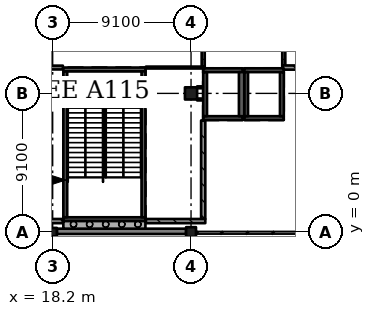
"""IFC4 building model, lengths in metres.
Left out: names, types, materials, properties, quantities, classifications, styles, units other than length and angle.
Written with IfcOpenShell. Run it as: python <this file> out.ifc"""

import sys

from ifc_helpers import new_model, si_unit, direction, frame, frame_2d, origin, origin_2d, place, context, subcontext, project, spatial, rectangle, extrude, element, fill, save


model = new_model("IFC4")
c1 = context("Model", 3, precision=1e-05, world=origin(), true_north=direction((0.0, 1.0)))
c2 = subcontext(c1, "Body", "Model", "MODEL_VIEW")
j1 = project(units=[si_unit("LENGTHUNIT", "METRE"), si_unit("PLANEANGLEUNIT", "RADIAN")], contexts=[c1])
p1 = place(None, origin())
s1 = spatial("IfcSite", under=j1, at=p1, CompositionType="ELEMENT")
p2 = place(p1, origin())
s2 = spatial("IfcBuilding", under=s1, at=p2, CompositionType="ELEMENT")
p3 = place(p2, frame((0.0, 0.0, 6.37)))
s3 = spatial("IfcBuildingStorey", under=s2, at=p3, CompositionType="ELEMENT", Elevation=6.37)
p4 = place(p3, frame((18.2, -0.025, 0.0), z_axis=(0.0, 0.0, 1.0), x_axis=(1.0, 0.0, 0.0)))
e1 = element("IfcColumn", 1, at=p4, inside=s3, PredefinedType="COLUMN", context=c2, shape_type="SweptSolid", body=[
    extrude(rectangle(XDim=0.55, YDim=0.55, at=origin_2d()), origin(), (0.0, 0.0, 1.0), 4.55),
])
p5 = place(p3, frame((18.2, 9.1, 0.0), z_axis=(0.0, 0.0, 1.0), x_axis=(1.0, 0.0, 0.0)))
e2 = element("IfcColumn", 2, at=p5, inside=s3, PredefinedType="COLUMN", context=c2, shape_type="SweptSolid", body=[
    extrude(rectangle(XDim=0.7, YDim=0.7, at=origin_2d()), origin(), (0.0, 0.0, 1.0), 4.55),
])
p6 = place(p3, frame((27.3, -0.025, 0.0), z_axis=(0.0, 0.0, 1.0), x_axis=(1.0, 0.0, 0.0)))
e3 = element("IfcColumn", 3, at=p6, inside=s3, PredefinedType="COLUMN", context=c2, shape_type="SweptSolid", body=[
    extrude(rectangle(XDim=0.65, YDim=0.65, at=origin_2d()), origin(), (0.0, 0.0, 1.0), 4.55),
])
p7 = place(p3, frame((27.3, 9.1, 0.0), z_axis=(0.0, 0.0, 1.0), x_axis=(1.0, 0.0, 0.0)))
e4 = element("IfcColumn", 4, at=p7, inside=s3, PredefinedType="COLUMN", context=c2, shape_type="SweptSolid", body=[
    extrude(rectangle(XDim=0.8, YDim=0.8, at=origin_2d()), origin(), (0.0, 0.0, 1.0), 4.55),
])
p8 = place(p3, frame((30.7, 7.475, 0.0), z_axis=(0.0, 0.0, 1.0), x_axis=(-1.0, 0.0, 0.0)))
e5 = element("IfcWall", 5, at=p8, inside=s3, PredefinedType="SHEAR", context=c2, shape_type="SweptSolid", body=[
    extrude(rectangle(XDim=2.6, YDim=0.25, at=frame_2d((1.3, 0.0))), origin(), (0.0, 0.0, 1.0), 4.55),
])
p9 = place(p3, frame((30.7, 10.625, 0.0), z_axis=(0.0, 0.0, 1.0), x_axis=(-1.0, 0.0, 0.0)))
e6 = element("IfcWall", 6, at=p9, inside=s3, PredefinedType="SHEAR", context=c2, shape_type="SweptSolid", body=[
    extrude(rectangle(XDim=2.6, YDim=0.25, at=frame_2d((1.3, 0.0))), origin(), (0.0, 0.0, 1.0), 4.55),
])
p10 = place(p9, frame((0.8, 0.0, 0.0)))
e7 = element("IfcOpeningElement", 7, at=p10, cuts=e6, PredefinedType="OPENING", context=c2, shape_type="SweptSolid", body=[
    extrude(rectangle(XDim=1.0, YDim=2.1, at=frame_2d((0.5, 1.05))), frame((0.0, 0.135, 0.0), z_axis=(0.0, -1.0, 0.0), x_axis=(1.0, 0.0, 0.0)), (0.0, 0.0, 1.0), 0.27),
])
p11 = place(p3, frame((28.225, 10.5, 0.0), z_axis=(0.0, 0.0, 1.0), x_axis=(0.0, -1.0, 0.0)))
e8 = element("IfcWall", 8, at=p11, inside=s3, PredefinedType="SHEAR", context=c2, shape_type="SweptSolid", body=[
    extrude(rectangle(XDim=2.9, YDim=0.25, at=frame_2d((1.45, 0.0))), origin(), (0.0, 0.0, 1.0), 4.55),
])
p12 = place(p3, frame((30.625, 10.5, 0.0), z_axis=(0.0, 0.0, 1.0), x_axis=(0.0, -1.0, 0.0)))
e9 = element("IfcWall", 9, at=p12, inside=s3, PredefinedType="SHEAR", context=c2, shape_type="SweptSolid", body=[
    extrude(rectangle(XDim=2.9, YDim=0.35, at=frame_2d((1.45, 0.0))), origin(), (0.0, 0.0, 1.0), 4.55),
])
p13 = place(p3, frame((33.4, 7.475, 0.0), z_axis=(0.0, 0.0, 1.0), x_axis=(-1.0, 0.0, 0.0)))
e10 = element("IfcWall", 10, at=p13, inside=s3, PredefinedType="SHEAR", context=c2, shape_type="SweptSolid", body=[
    extrude(rectangle(XDim=2.6, YDim=0.25, at=frame_2d((1.3, 0.0))), origin(), (0.0, 0.0, 1.0), 4.55),
])
p14 = place(p3, frame((33.4, 10.625, 0.0), z_axis=(0.0, 0.0, 1.0), x_axis=(-1.0, 0.0, 0.0)))
e11 = element("IfcWall", 11, at=p14, inside=s3, PredefinedType="SHEAR", context=c2, shape_type="SweptSolid", body=[
    extrude(rectangle(XDim=2.6, YDim=0.25, at=frame_2d((1.3, 0.0))), origin(), (0.0, 0.0, 1.0), 4.55),
])
p15 = place(p14, frame((0.8, 0.0, 0.0)))
e12 = element("IfcOpeningElement", 12, at=p15, cuts=e11, PredefinedType="OPENING", context=c2, shape_type="SweptSolid", body=[
    extrude(rectangle(XDim=1.0, YDim=2.1, at=frame_2d((0.5, 1.05))), frame((0.0, 0.135, 0.0), z_axis=(0.0, -1.0, 0.0), x_axis=(1.0, 0.0, 0.0)), (0.0, 0.0, 1.0), 0.27),
])
for number, where, z_axis, x_axis in (
    (13, (30.925, 10.5, 0.0), (0.0, 0.0, 1.0), (0.0, -1.0, 0.0)),
    (14, (33.275, 10.5, 0.0), (0.0, 0.0, 1.0), (0.0, -1.0, 0.0)),
):
    element("IfcWall", number, at=place(p3, frame(where, z_axis=z_axis, x_axis=x_axis)), inside=s3, PredefinedType="SHEAR", context=c2, shape_type="SweptSolid", body=[
        extrude(rectangle(XDim=2.9, YDim=0.25, at=frame_2d((1.45, 0.0))), origin(), (0.0, 0.0, 1.0), 4.55),
    ])
p16 = place(p3, frame((24.3, 0.825, 0.0), z_axis=(0.0, 0.0, 1.0), x_axis=(-1.0, 0.0, 0.0)))
e15 = element("IfcWall", 15, at=p16, inside=s3, PredefinedType="SHEAR", context=c2, shape_type="SweptSolid", body=[
    extrude(rectangle(XDim=5.4, YDim=0.25, at=frame_2d((2.7, 0.0))), origin(), (0.0, 0.0, 1.0), 4.55),
])
p17 = place(p3, frame((24.3, 10.675, 0.0), z_axis=(0.0, 0.0, 1.0), x_axis=(-1.0, 0.0, 0.0)))
e16 = element("IfcWall", 16, at=p17, inside=s3, PredefinedType="SHEAR", context=c2, shape_type="SweptSolid", body=[
    extrude(rectangle(XDim=5.4, YDim=0.25, at=frame_2d((2.7, 0.0))), origin(), (0.0, 0.0, 1.0), 4.55),
])
p18 = place(p17, frame((1.5, 0.0, 0.0)))
e17 = element("IfcOpeningElement", 17, at=p18, cuts=e16, PredefinedType="OPENING", context=c2, shape_type="SweptSolid", body=[
    extrude(rectangle(XDim=2.4, YDim=2.1, at=frame_2d((1.2, 1.05))), frame((0.0, 0.135, 0.0), z_axis=(0.0, -1.0, 0.0), x_axis=(1.0, 0.0, 0.0)), (0.0, 0.0, 1.0), 0.27),
])
for number, where, z_axis, x_axis in (
    (18, (19.025, 10.55, 0.0), (0.0, 0.0, 1.0), (0.0, -1.0, 0.0)),
    (19, (24.175, 10.55, 0.0), (0.0, 0.0, 1.0), (0.0, -1.0, 0.0)),
):
    element("IfcWall", number, at=place(p3, frame(where, z_axis=z_axis, x_axis=x_axis)), inside=s3, PredefinedType="SHEAR", context=c2, shape_type="SweptSolid", body=[
        extrude(rectangle(XDim=9.6, YDim=0.25, at=frame_2d((4.8, 0.0))), origin(), (0.0, 0.0, 1.0), 4.55),
    ])
p19 = place(p3, frame((18.475, 0.025, 0.0), z_axis=(0.0, 0.0, 1.0), x_axis=(1.0, 0.0, 0.0)))
e20 = element("IfcWall", 20, at=p19, inside=s3, PredefinedType="SOLIDWALL", context=c2, shape_type="SweptSolid", body=[
    extrude(rectangle(XDim=8.5, YDim=0.35, at=frame_2d((4.25, 0.0))), origin(), (0.0, 0.0, 1.0), 3.5),
])
p20 = place(p3, frame((18.9, 0.45, 0.0), z_axis=(0.0, 0.0, 1.0), x_axis=(1.0, 0.0, 0.0)))
e21 = element("IfcWall", 21, at=p20, inside=s3, PredefinedType="SOLIDWALL", context=c2, shape_type="SweptSolid", body=[
    extrude(rectangle(XDim=5.4, YDim=0.5, at=frame_2d((2.7, 0.0))), origin(), (0.0, 0.0, 1.0), 4.55),
])
p21 = place(p3, frame((18.55, 8.75, 0.0), z_axis=(0.0, 0.0, 1.0), x_axis=(1.0, 0.0, 0.0)))
e22 = element("IfcWall", 22, at=p21, inside=s3, PredefinedType="SOLIDWALL", context=c2, shape_type="SweptSolid", body=[
    extrude(rectangle(XDim=0.32, YDim=0.25, at=frame_2d((0.16, 0.0))), origin(), (0.0, 0.0, 1.0), 4.25),
])
p22 = place(p3, frame((18.87, 0.7, 0.0), z_axis=(0.0, 0.0, 1.0), x_axis=(-1.0, 0.0, 0.0)))
e23 = element("IfcWall", 23, at=p22, inside=s3, PredefinedType="SOLIDWALL", context=c2, shape_type="SweptSolid", body=[
    extrude(rectangle(XDim=3.64, YDim=0.275, at=frame_2d((1.82, 0.0))), origin(), (0.0, 0.0, 1.0), 4.25),
])
p23 = place(p3, frame((18.87, 9.45, 0.0), z_axis=(0.0, 0.0, 1.0), x_axis=(-1.0, 0.0, 0.0)))
e24 = element("IfcWall", 24, at=p23, inside=s3, PredefinedType="SOLIDWALL", context=c2, shape_type="SweptSolid", body=[
    extrude(rectangle(XDim=0.32, YDim=0.25, at=frame_2d((0.16, 0.0))), origin(), (0.0, 0.0, 1.0), 4.25),
])
p24 = place(p3, frame((18.87, 10.8, 0.0), z_axis=(0.0, 0.0, 1.0), x_axis=(-1.0, 0.0, 0.0)))
e25 = element("IfcWall", 25, at=p24, inside=s3, PredefinedType="SOLIDWALL", context=c2, shape_type="SweptSolid", body=[
    extrude(rectangle(XDim=3.64, YDim=0.25, at=frame_2d((1.82, 0.0))), origin(), (0.0, 0.0, 1.0), 4.25),
])
p25 = place(p24, frame((1.35, 0.0, 0.0)))
e26 = element("IfcOpeningElement", 26, at=p25, cuts=e25, PredefinedType="OPENING", context=c2, shape_type="SweptSolid", body=[
    extrude(rectangle(XDim=1.0, YDim=2.1, at=frame_2d((0.5, 1.05))), frame((0.0, 0.135, 0.0), z_axis=(0.0, -1.0, 0.0), x_axis=(1.0, 0.0, 0.0)), (0.0, 0.0, 1.0), 0.27),
])
for number, where, z_axis, x_axis in (
    (27, (27.7, 8.7, 0.0), (0.0, 0.0, 1.0), (1.0, 0.0, 0.0)),
    (28, (28.07, 9.5, 0.0), (0.0, 0.0, 1.0), (-1.0, 0.0, 0.0)),
):
    element("IfcWall", number, at=place(p3, frame(where, z_axis=z_axis, x_axis=x_axis)), inside=s3, PredefinedType="PARTITIONING", context=c2, shape_type="SweptSolid", body=[
        extrude(rectangle(XDim=0.37, YDim=0.125, at=frame_2d((0.185, 0.0))), origin(), (0.0, 0.0, 1.0), 4.25),
    ])
p26 = place(p3, frame((28.1, 7.32, 0.0), z_axis=(0.0, 0.0, 1.0), x_axis=(0.0, -1.0, 0.0)))
e29 = element("IfcWall", 29, at=p26, inside=s3, PredefinedType="SOLIDWALL", context=c2, shape_type="SweptSolid", body=[
    extrude(rectangle(XDim=6.483, YDim=0.275, at=frame_2d((3.241, 0.0))), origin(), (0.0, 0.0, 1.0), 4.25),
])
p27 = place(p3, frame((28.1, 13.7, 0.0), z_axis=(0.0, 0.0, 1.0), x_axis=(0.0, -1.0, 0.0)))
e30 = element("IfcWall", 30, at=p27, inside=s3, PredefinedType="PARTITIONING", context=c2, shape_type="SweptSolid", body=[
    extrude(rectangle(XDim=2.837, YDim=0.2, at=frame_2d((1.419, 0.0))), origin(), (0.0, 0.0, 1.0), 4.25),
])
p28 = place(p27, frame((0.55, 0.0, 0.0)))
e31 = element("IfcOpeningElement", 31, at=p28, cuts=e30, PredefinedType="OPENING", context=c2, shape_type="SweptSolid", body=[
    extrude(rectangle(XDim=1.8, YDim=2.4, at=frame_2d((0.9, 1.2))), frame((0.0, 0.11, 0.0), z_axis=(0.0, -1.0, 0.0), x_axis=(1.0, 0.0, 0.0)), (0.0, 0.0, 1.0), 0.22),
])
p29 = place(p3, frame((28.2, 10.8, 0.0), z_axis=(0.0, 0.0, 1.0), x_axis=(-1.0, 0.0, 0.0)))
e32 = element("IfcWall", 32, at=p29, inside=s3, PredefinedType="PARTITIONING", context=c2, shape_type="SweptSolid", body=[
    extrude(rectangle(XDim=3.87, YDim=0.125, at=frame_2d((1.935, 0.0))), origin(), (0.0, 0.0, 1.0), 4.25),
])
p30 = place(p29, frame((1.45, 0.0, 0.0)))
e33 = element("IfcOpeningElement", 33, at=p30, cuts=e32, PredefinedType="OPENING", context=c2, shape_type="SweptSolid", body=[
    extrude(rectangle(XDim=0.9, YDim=2.1, at=frame_2d((0.45, 1.05))), frame((0.0, 0.073, 0.0), z_axis=(0.0, -1.0, 0.0), x_axis=(1.0, 0.0, 0.0)), (0.0, 0.0, 1.0), 0.145),
])
p31 = place(p3, frame((28.238, 0.7, 0.0), z_axis=(0.0, 0.0, 1.0), x_axis=(-1.0, 0.0, 0.0)))
e34 = element("IfcWall", 34, at=p31, inside=s3, PredefinedType="SOLIDWALL", context=c2, shape_type="SweptSolid", body=[
    extrude(rectangle(XDim=3.907, YDim=0.275, at=frame_2d((1.954, 0.0))), origin(), (0.0, 0.0, 1.0), 4.25),
])
p32 = place(p3, frame((33.4, 10.938, 0.0), z_axis=(0.0, 0.0, 1.0), x_axis=(0.0, 1.0, 0.0)))
e35 = element("IfcWall", 35, at=p32, inside=s3, PredefinedType="PARTITIONING", context=c2, shape_type="SweptSolid", body=[
    extrude(rectangle(XDim=2.762, YDim=0.2, at=frame_2d((1.381, 0.0))), origin(), (0.0, 0.0, 1.0), 4.25),
])
p33 = place(p32, frame((0.45, 0.0, 0.0)))
e36 = element("IfcOpeningElement", 36, at=p33, cuts=e35, PredefinedType="OPENING", context=c2, shape_type="SweptSolid", body=[
    extrude(rectangle(XDim=1.8, YDim=2.4, at=frame_2d((0.9, 1.2))), frame((0.0, 0.11, 0.0), z_axis=(0.0, -1.0, 0.0), x_axis=(1.0, 0.0, 0.0)), (0.0, 0.0, 1.0), 0.22),
])
p34 = place(p3, frame((36.113, 10.8, 0.0), z_axis=(0.0, 0.0, 1.0), x_axis=(-1.0, 0.0, 0.0)))
e37 = element("IfcWall", 37, at=p34, inside=s3, PredefinedType="SOLIDWALL", context=c2, shape_type="SweptSolid", body=[
    extrude(rectangle(XDim=2.812, YDim=0.275, at=frame_2d((1.406, 0.0))), origin(), (0.0, 0.0, 1.0), 4.25),
])
p35 = place(p30, origin())
e38 = element("IfcDoor", 38, at=p35, inside=s3, OperationType="SINGLE_SWING_RIGHT", PredefinedType="DOOR", context=c2, shape_type="SweptSolid", body=[
    extrude(rectangle(XDim=0.9, YDim=2.1, at=frame_2d((0.45, 1.05))), frame((0.0, 0.025, 0.0), z_axis=(0.0, -1.0, 0.0), x_axis=(1.0, 0.0, 0.0)), (0.0, 0.0, 1.0), 0.05),
])
fill(e33, e38)
p36 = place(p28, origin())
e39 = element("IfcDoor", 39, at=p36, inside=s3, OperationType="DOUBLE_DOOR_SINGLE_SWING", PredefinedType="DOOR", context=c2, shape_type="SweptSolid", body=[
    extrude(rectangle(XDim=1.8, YDim=2.4, at=frame_2d((0.9, 1.2))), frame((0.0, 0.025, 0.0), z_axis=(0.0, -1.0, 0.0), x_axis=(1.0, 0.0, 0.0)), (0.0, 0.0, 1.0), 0.05),
])
fill(e31, e39)
p37 = place(p33, origin())
e40 = element("IfcDoor", 40, at=p37, inside=s3, OperationType="DOUBLE_DOOR_SINGLE_SWING", PredefinedType="DOOR", context=c2, shape_type="SweptSolid", body=[
    extrude(rectangle(XDim=1.8, YDim=2.4, at=frame_2d((0.9, 1.2))), frame((0.0, 0.025, 0.0), z_axis=(0.0, -1.0, 0.0), x_axis=(1.0, 0.0, 0.0)), (0.0, 0.0, 1.0), 0.05),
])
fill(e36, e40)
p38 = place(p18, origin())
e41 = element("IfcDoor", 41, at=p38, inside=s3, OperationType="DOUBLE_DOOR_SINGLE_SWING", PredefinedType="DOOR", context=c2, shape_type="SweptSolid", body=[
    extrude(rectangle(XDim=2.4, YDim=2.1, at=frame_2d((1.2, 1.05))), frame((0.0, 0.025, 0.0), z_axis=(0.0, -1.0, 0.0), x_axis=(1.0, 0.0, 0.0)), (0.0, 0.0, 1.0), 0.05),
])
fill(e17, e41)
p39 = place(p10, origin())
e42 = element("IfcDoor", 42, at=p39, inside=s3, OperationType="DOUBLE_DOOR_SLIDING", PredefinedType="DOOR", context=c2, shape_type="SweptSolid", body=[
    extrude(rectangle(XDim=1.0, YDim=2.1, at=frame_2d((0.5, 1.05))), frame((0.0, 0.025, 0.0), z_axis=(0.0, -1.0, 0.0), x_axis=(1.0, 0.0, 0.0)), (0.0, 0.0, 1.0), 0.05),
])
fill(e7, e42)
p40 = place(p15, origin())
e43 = element("IfcDoor", 43, at=p40, inside=s3, OperationType="DOUBLE_DOOR_SLIDING", PredefinedType="DOOR", context=c2, shape_type="SweptSolid", body=[
    extrude(rectangle(XDim=1.0, YDim=2.1, at=frame_2d((0.5, 1.05))), frame((0.0, 0.025, 0.0), z_axis=(0.0, -1.0, 0.0), x_axis=(1.0, 0.0, 0.0)), (0.0, 0.0, 1.0), 0.05),
])
fill(e12, e43)
save(model, sys.argv[1])
